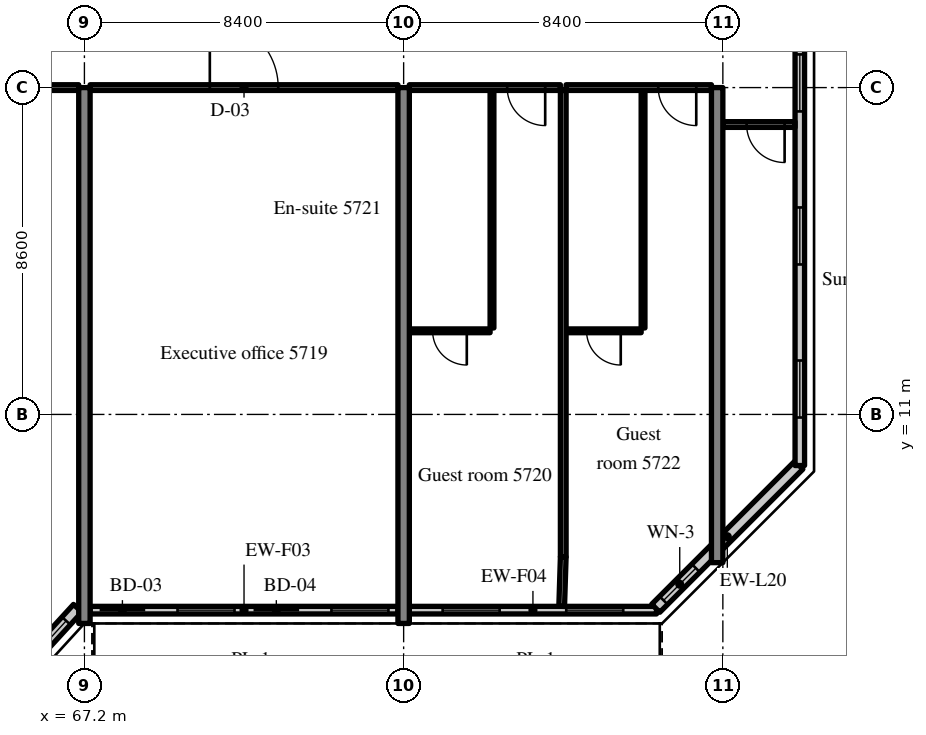
"""IFC4 building model, lengths in metres.
Left out: names, types, materials, properties, quantities, classifications, styles, units other than length and angle.
Written with IfcOpenShell. Run it as: python <this file> out.ifc"""

import sys

from ifc_helpers import new_model, si_unit, direction, frame, frame_2d, origin, place, context, subcontext, project, spatial, rectangle, extrude, source, transform, mapped, element, fill, save


model = new_model("IFC4")
c1 = context("Model", 3, precision=1e-05, world=origin(), true_north=direction((0.0, 1.0)))
c2 = subcontext(c1, "Body", "Model", "MODEL_VIEW")
j1 = project(units=[si_unit("LENGTHUNIT", "METRE"), si_unit("PLANEANGLEUNIT", "RADIAN")], contexts=[c1])
p1 = place(None, origin())
s1 = spatial("IfcSite", under=j1, at=p1, CompositionType="ELEMENT")
p2 = place(p1, origin())
s2 = spatial("IfcBuilding", under=s1, at=p2, CompositionType="ELEMENT")
p3 = place(p2, frame((0.0, 0.0, 237.4)))
s3 = spatial("IfcBuildingStorey", under=s2, at=p3, CompositionType="ELEMENT", Elevation=237.4)
m1 = source(origin(), c2, "Body", "SweptSolid", [
    extrude(rectangle(XDim=14.1, YDim=0.3, at=frame_2d((7.05, 0.0))), origin(), (0.0, 0.0, 1.0), 3.62),
])
for number, where, z_axis, x_axis in (
    (1, (67.2, 5.5, 0.0), (0.0, 0.0, 1.0), (0.0, 1.0, 0.0)),
    (2, (75.6, 5.5, 0.0), (0.0, 0.0, 1.0), (0.0, 1.0, 0.0)),
):
    element("IfcWall", number, at=place(p3, frame(where, z_axis=z_axis, x_axis=x_axis)), inside=s3, PredefinedType="SHEAR", context=c2, shape_type="MappedRepresentation", body=[
        mapped(m1, transform((0.0, 0.0, 0.0), scale=1.0)),
    ])
m2 = source(origin(), c2, "Body", "SweptSolid", [
    extrude(rectangle(XDim=12.5, YDim=0.3, at=frame_2d((6.25, 0.0))), origin(), (0.0, 0.0, 1.0), 3.62),
])
p4 = place(p3, frame((83.85, 7.1, 0.0), z_axis=(0.0, 0.0, 1.0), x_axis=(0.0, 1.0, 0.0)))
e3 = element("IfcWall", 3, at=p4, inside=s3, PredefinedType="SHEAR", context=c2, shape_type="MappedRepresentation", body=[
    mapped(m2, transform((0.0, 0.0, 0.0), scale=1.0)),
])
m3 = source(origin(), c2, "Body", "SweptSolid", [
    extrude(rectangle(XDim=2.398, YDim=0.3, at=frame_2d((1.199, 0.0))), origin(), (0.0, 0.0, 1.0), 3.62),
])
p5 = place(p3, frame((65.404, 4.131, 0.0), z_axis=(0.0, 0.0, 1.0), x_axis=(0.675374189419, 0.737475222815, 0.0)))
e4 = element("IfcWall", 4, at=p5, inside=s3, PredefinedType="SOLIDWALL", context=c2, shape_type="MappedRepresentation", body=[
    mapped(m3, transform((0.0, 0.0, 0.0), scale=1.0)),
])
m4 = source(origin(), c2, "Body", "SweptSolid", [
    extrude(rectangle(XDim=1.5, YDim=2.0, at=frame_2d((0.75, 1.0))), frame((0.0, 0.16, 0.0), z_axis=(0.0, -1.0, 0.0), x_axis=(1.0, 0.0, 0.0)), (0.0, 0.0, 1.0), 0.32),
])
p6 = place(p5, frame((0.449, 0.0, 0.9)))
e5 = element("IfcOpeningElement", 5, at=p6, cuts=e4, PredefinedType="OPENING", context=c2, shape_type="MappedRepresentation", body=[
    mapped(m4, transform((0.0, 0.0, 0.0), scale=1.0)),
])
m5 = source(origin(), c2, "Body", "SweptSolid", [
    extrude(rectangle(XDim=8.1, YDim=0.2, at=frame_2d((4.05, 0.0))), origin(), (0.0, 0.0, 1.0), 3.02),
])
p7 = place(p3, frame((67.35, 5.85, 0.0), z_axis=(0.0, 0.0, 1.0), x_axis=(1.0, 0.0, 0.0)))
e6 = element("IfcWall", 6, at=p7, inside=s3, PredefinedType="SOLIDWALL", context=c2, shape_type="MappedRepresentation", body=[
    mapped(m5, transform((0.0, 0.0, 0.0), scale=1.0)),
])
m6 = source(origin(), c2, "Body", "SweptSolid", [
    extrude(rectangle(XDim=1.2, YDim=2.4, at=frame_2d((0.6, 1.2))), frame((0.0, 0.11, 0.0), z_axis=(0.0, -1.0, 0.0), x_axis=(1.0, 0.0, 0.0)), (0.0, 0.0, 1.0), 0.22),
])
p8 = place(p7, frame((0.25, 0.0, 0.0)))
e7 = element("IfcOpeningElement", 7, at=p8, cuts=e6, PredefinedType="OPENING", context=c2, shape_type="MappedRepresentation", body=[
    mapped(m6, transform((0.0, 0.0, 0.0), scale=1.0)),
])
m7 = source(origin(), c2, "Body", "SweptSolid", [
    extrude(rectangle(XDim=1.5, YDim=1.5, at=frame_2d((0.75, 0.75))), frame((0.0, 0.11, 0.0), z_axis=(0.0, -1.0, 0.0), x_axis=(1.0, 0.0, 0.0)), (0.0, 0.0, 1.0), 0.22),
])
p9 = place(p7, frame((2.3, 0.0, 0.9)))
e8 = element("IfcOpeningElement", 8, at=p9, cuts=e6, PredefinedType="OPENING", context=c2, shape_type="MappedRepresentation", body=[
    mapped(m7, transform((0.0, 0.0, 0.0), scale=1.0)),
])
p10 = place(p7, frame((4.3, 0.0, 0.0)))
e9 = element("IfcOpeningElement", 9, at=p10, cuts=e6, PredefinedType="OPENING", context=c2, shape_type="MappedRepresentation", body=[
    mapped(m6, transform((0.0, 0.0, 0.0), scale=1.0)),
])
p11 = place(p7, frame((6.35, 0.0, 0.9)))
e10 = element("IfcOpeningElement", 10, at=p11, cuts=e6, PredefinedType="OPENING", context=c2, shape_type="MappedRepresentation", body=[
    mapped(m7, transform((0.0, 0.0, 0.0), scale=1.0)),
])
m8 = source(origin(), c2, "Body", "SweptSolid", [
    extrude(rectangle(XDim=6.505, YDim=0.2, at=frame_2d((3.252, 0.0))), origin(), (0.0, 0.0, 1.0), 3.02),
])
p12 = place(p3, frame((75.75, 5.85, 0.0), z_axis=(0.0, 0.0, 1.0), x_axis=(1.0, 0.0, 0.0)))
e11 = element("IfcWall", 11, at=p12, inside=s3, PredefinedType="SOLIDWALL", context=c2, shape_type="MappedRepresentation", body=[
    mapped(m8, transform((0.0, 0.0, 0.0), scale=1.0)),
])
p13 = place(p12, frame((0.876, 0.0, 0.9)))
e12 = element("IfcOpeningElement", 12, at=p13, cuts=e11, PredefinedType="OPENING", context=c2, shape_type="MappedRepresentation", body=[
    mapped(m7, transform((0.0, 0.0, 0.0), scale=1.0)),
])
p14 = place(p12, frame((4.129, 0.0, 0.9)))
e13 = element("IfcOpeningElement", 13, at=p14, cuts=e11, PredefinedType="OPENING", context=c2, shape_type="MappedRepresentation", body=[
    mapped(m7, transform((0.0, 0.0, 0.0), scale=1.0)),
])
m9 = source(origin(), c2, "Body", "SweptSolid", [
    extrude(rectangle(XDim=5.326, YDim=0.3, at=frame_2d((2.663, 0.0))), origin(), (0.0, 0.0, 1.0), 3.62),
])
p15 = place(p3, frame((82.234, 5.9, 0.0), z_axis=(0.0, 0.0, 1.0), x_axis=(0.707083859269, 0.707129702361, 0.0)))
e14 = element("IfcWall", 14, at=p15, inside=s3, PredefinedType="SOLIDWALL", context=c2, shape_type="MappedRepresentation", body=[
    mapped(m9, transform((0.0, 0.0, 0.0), scale=1.0)),
])
m10 = source(origin(), c2, "Body", "SweptSolid", [
    extrude(rectangle(XDim=1.2, YDim=1.5, at=frame_2d((0.6, 0.75))), frame((0.0, 0.16, 0.0), z_axis=(0.0, -1.0, 0.0), x_axis=(1.0, 0.0, 0.0)), (0.0, 0.0, 1.0), 0.32),
])
p16 = place(p15, frame((0.292, 0.0, 0.9)))
e15 = element("IfcOpeningElement", 15, at=p16, cuts=e14, PredefinedType="OPENING", context=c2, shape_type="MappedRepresentation", body=[
    mapped(m10, transform((0.0, 0.0, 0.0), scale=1.0)),
])
m11 = source(origin(), c2, "Body", "SweptSolid", [
    extrude(rectangle(XDim=28.189, YDim=0.25, at=frame_2d((14.095, 0.0))), origin(), (0.0, 0.0, 1.0), 3.62),
])
p17 = place(p3, frame((86.025, 9.655, 0.0), z_axis=(0.0, 0.0, 1.0), x_axis=(0.0, 1.0, 0.0)))
e16 = element("IfcWall", 16, at=p17, inside=s3, PredefinedType="SOLIDWALL", context=c2, shape_type="MappedRepresentation", body=[
    mapped(m11, transform((0.0, 0.0, 0.0), scale=1.0)),
])
m12 = source(origin(), c2, "Body", "SweptSolid", [
    extrude(rectangle(XDim=1.5, YDim=1.5, at=frame_2d((0.75, 0.75))), frame((0.0, 0.135, 0.0), z_axis=(0.0, -1.0, 0.0), x_axis=(1.0, 0.0, 0.0)), (0.0, 0.0, 1.0), 0.27),
])
p18 = place(p17, frame((1.263, 0.0, 0.9)))
e17 = element("IfcOpeningElement", 17, at=p18, cuts=e16, PredefinedType="OPENING", context=c2, shape_type="MappedRepresentation", body=[
    mapped(m12, transform((0.0, 0.0, 0.0), scale=1.0)),
])
p19 = place(p17, frame((5.291, 0.0, 0.9)))
e18 = element("IfcOpeningElement", 18, at=p19, cuts=e16, PredefinedType="OPENING", context=c2, shape_type="MappedRepresentation", body=[
    mapped(m12, transform((0.0, 0.0, 0.0), scale=1.0)),
])
p20 = place(p17, frame((9.318, 0.0, 0.9)))
e19 = element("IfcOpeningElement", 19, at=p20, cuts=e16, PredefinedType="OPENING", context=c2, shape_type="MappedRepresentation", body=[
    mapped(m12, transform((0.0, 0.0, 0.0), scale=1.0)),
])
p21 = place(p17, frame((13.345, 0.0, 0.9)))
e20 = element("IfcOpeningElement", 20, at=p21, cuts=e16, PredefinedType="OPENING", context=c2, shape_type="MappedRepresentation", body=[
    mapped(m12, transform((0.0, 0.0, 0.0), scale=1.0)),
])
p22 = place(p17, frame((17.372, 0.0, 0.9)))
e21 = element("IfcOpeningElement", 21, at=p22, cuts=e16, PredefinedType="OPENING", context=c2, shape_type="MappedRepresentation", body=[
    mapped(m12, transform((0.0, 0.0, 0.0), scale=1.0)),
])
p23 = place(p17, frame((21.399, 0.0, 0.9)))
e22 = element("IfcOpeningElement", 22, at=p23, cuts=e16, PredefinedType="OPENING", context=c2, shape_type="MappedRepresentation", body=[
    mapped(m12, transform((0.0, 0.0, 0.0), scale=1.0)),
])
p24 = place(p17, frame((25.426, 0.0, 0.9)))
e23 = element("IfcOpeningElement", 23, at=p24, cuts=e16, PredefinedType="OPENING", context=c2, shape_type="MappedRepresentation", body=[
    mapped(m12, transform((0.0, 0.0, 0.0), scale=1.0)),
])
m13 = source(origin(), c2, "Body", "SweptSolid", [
    extrude(rectangle(XDim=3.975, YDim=0.15, at=frame_2d((1.988, 0.0))), origin(), (0.0, 0.0, 1.0), 2.92),
])
p25 = place(p3, frame((63.075, 19.6, 0.0), z_axis=(0.0, 0.0, 1.0), x_axis=(1.0, 0.0, 0.0)))
e24 = element("IfcWall", 24, at=p25, inside=s3, PredefinedType="PARTITIONING", context=c2, shape_type="MappedRepresentation", body=[
    mapped(m13, transform((0.0, 0.0, 0.0), scale=1.0)),
])
m14 = source(origin(), c2, "Body", "SweptSolid", [
    extrude(rectangle(XDim=1.0, YDim=2.1, at=frame_2d((0.5, 1.05))), frame((0.0, 0.085, 0.0), z_axis=(0.0, -1.0, 0.0), x_axis=(1.0, 0.0, 0.0)), (0.0, 0.0, 1.0), 0.17),
])
p26 = place(p25, frame((1.487, 0.0, 0.0)))
e25 = element("IfcOpeningElement", 25, at=p26, cuts=e24, PredefinedType="OPENING", context=c2, shape_type="MappedRepresentation", body=[
    mapped(m14, transform((0.0, 0.0, 0.0), scale=1.0)),
])
m15 = source(origin(), c2, "Body", "SweptSolid", [
    extrude(rectangle(XDim=8.1, YDim=0.15, at=frame_2d((4.05, 0.0))), origin(), (0.0, 0.0, 1.0), 2.92),
])
p27 = place(p3, frame((67.35, 19.6, 0.0), z_axis=(0.0, 0.0, 1.0), x_axis=(1.0, 0.0, 0.0)))
e26 = element("IfcWall", 26, at=p27, inside=s3, PredefinedType="PARTITIONING", context=c2, shape_type="MappedRepresentation", body=[
    mapped(m15, transform((0.0, 0.0, 0.0), scale=1.0)),
])
m16 = source(origin(), c2, "Body", "SweptSolid", [
    extrude(rectangle(XDim=1.8, YDim=2.1, at=frame_2d((0.9, 1.05))), frame((0.0, 0.085, 0.0), z_axis=(0.0, -1.0, 0.0), x_axis=(1.0, 0.0, 0.0)), (0.0, 0.0, 1.0), 0.17),
])
p28 = place(p27, frame((3.15, 0.0, 0.0)))
e27 = element("IfcOpeningElement", 27, at=p28, cuts=e26, PredefinedType="OPENING", context=c2, shape_type="MappedRepresentation", body=[
    mapped(m16, transform((0.0, 0.0, 0.0), scale=1.0)),
])
m17 = source(origin(), c2, "Body", "SweptSolid", [
    extrude(rectangle(XDim=6.25, YDim=0.1, at=frame_2d((3.125, 0.0))), origin(), (0.0, 0.0, 1.0), 3.62),
])
p29 = place(p3, frame((77.925, 13.275, 0.0), z_axis=(0.0, 0.0, 1.0), x_axis=(0.0, 1.0, 0.0)))
e28 = element("IfcWall", 28, at=p29, inside=s3, PredefinedType="PARTITIONING", context=c2, shape_type="MappedRepresentation", body=[
    mapped(m17, transform((0.0, 0.0, 0.0), scale=1.0)),
])
m18 = source(origin(), c2, "Body", "SweptSolid", [
    extrude(rectangle(XDim=2.125, YDim=0.1, at=frame_2d((1.062, 0.0))), origin(), (0.0, 0.0, 1.0), 3.62),
])
p30 = place(p3, frame((75.75, 13.2, 0.0), z_axis=(0.0, 0.0, 1.0), x_axis=(1.0, 0.0, 0.0)))
e29 = element("IfcWall", 29, at=p30, inside=s3, PredefinedType="PARTITIONING", context=c2, shape_type="MappedRepresentation", body=[
    mapped(m18, transform((0.0, 0.0, 0.0), scale=1.0)),
])
m19 = source(origin(), c2, "Body", "SweptSolid", [
    extrude(rectangle(XDim=0.9, YDim=2.1, at=frame_2d((0.45, 1.05))), frame((0.0, 0.06, 0.0), z_axis=(0.0, -1.0, 0.0), x_axis=(1.0, 0.0, 0.0)), (0.0, 0.0, 1.0), 0.12),
])
p31 = place(p30, frame((0.612, 0.0, 0.0)))
e30 = element("IfcOpeningElement", 30, at=p31, cuts=e29, PredefinedType="OPENING", context=c2, shape_type="MappedRepresentation", body=[
    mapped(m19, transform((0.0, 0.0, 0.0), scale=1.0)),
])
p32 = place(p3, frame((75.75, 19.6, 0.0), z_axis=(0.0, 0.0, 1.0), x_axis=(1.0, 0.0, 0.0)))
e31 = element("IfcWall", 31, at=p32, inside=s3, PredefinedType="PARTITIONING", context=c2, shape_type="MappedRepresentation", body=[
    mapped(m13, transform((0.0, 0.0, 0.0), scale=1.0)),
])
p33 = place(p32, frame((2.575, 0.0, 0.0)))
e32 = element("IfcOpeningElement", 32, at=p33, cuts=e31, PredefinedType="OPENING", context=c2, shape_type="MappedRepresentation", body=[
    mapped(m14, transform((0.0, 0.0, 0.0), scale=1.0)),
])
p34 = place(p3, frame((81.9, 13.275, 0.0), z_axis=(0.0, 0.0, 1.0), x_axis=(0.0, 1.0, 0.0)))
e33 = element("IfcWall", 33, at=p34, inside=s3, PredefinedType="PARTITIONING", context=c2, shape_type="MappedRepresentation", body=[
    mapped(m17, transform((0.0, 0.0, 0.0), scale=1.0)),
])
m20 = source(origin(), c2, "Body", "SweptSolid", [
    extrude(rectangle(XDim=1.975, YDim=0.1, at=frame_2d((0.988, 0.0))), origin(), (0.0, 0.0, 1.0), 3.62),
])
p35 = place(p3, frame((79.875, 13.2, 0.0), z_axis=(0.0, 0.0, 1.0), x_axis=(1.0, 0.0, 0.0)))
e34 = element("IfcWall", 34, at=p35, inside=s3, PredefinedType="PARTITIONING", context=c2, shape_type="MappedRepresentation", body=[
    mapped(m20, transform((0.0, 0.0, 0.0), scale=1.0)),
])
p36 = place(p35, frame((0.538, 0.0, 0.0)))
e35 = element("IfcOpeningElement", 35, at=p36, cuts=e34, PredefinedType="OPENING", context=c2, shape_type="MappedRepresentation", body=[
    mapped(m19, transform((0.0, 0.0, 0.0), scale=1.0)),
])
m21 = source(origin(), c2, "Body", "SweptSolid", [
    extrude(rectangle(XDim=3.825, YDim=0.15, at=frame_2d((1.913, 0.0))), origin(), (0.0, 0.0, 1.0), 2.92),
])
p37 = place(p3, frame((79.875, 19.6, 0.0), z_axis=(0.0, 0.0, 1.0), x_axis=(1.0, 0.0, 0.0)))
e36 = element("IfcWall", 36, at=p37, inside=s3, PredefinedType="PARTITIONING", context=c2, shape_type="MappedRepresentation", body=[
    mapped(m21, transform((0.0, 0.0, 0.0), scale=1.0)),
])
p38 = place(p37, frame((2.425, 0.0, 0.0)))
e37 = element("IfcOpeningElement", 37, at=p38, cuts=e36, PredefinedType="OPENING", context=c2, shape_type="MappedRepresentation", body=[
    mapped(m14, transform((0.0, 0.0, 0.0), scale=1.0)),
])
m22 = source(origin(), c2, "Body", "SweptSolid", [
    extrude(rectangle(XDim=12.275, YDim=0.15, at=frame_2d((6.137, 0.0))), origin(), (0.0, 0.0, 1.0), 3.62),
])
p39 = place(p3, frame((79.8, 7.25, 0.0), z_axis=(0.0, 0.0, 1.0), x_axis=(0.0, 1.0, 0.0)))
e38 = element("IfcWall", 38, at=p39, inside=s3, PredefinedType="PARTITIONING", context=c2, shape_type="MappedRepresentation", body=[
    mapped(m22, transform((0.0, 0.0, 0.0), scale=1.0)),
])
m23 = source(origin(), c2, "Body", "SweptSolid", [
    extrude(rectangle(XDim=1.9, YDim=0.15, at=frame_2d((0.95, 0.0))), origin(), (0.0, 0.0, 1.0), 2.92),
])
p40 = place(p3, frame((84.0, 18.628, 0.0), z_axis=(0.0, 0.0, 1.0), x_axis=(1.0, 0.0, 0.0)))
e39 = element("IfcWall", 39, at=p40, inside=s3, PredefinedType="PARTITIONING", context=c2, shape_type="MappedRepresentation", body=[
    mapped(m23, transform((0.0, 0.0, 0.0), scale=1.0)),
])
p41 = place(p40, frame((0.625, 0.0, 0.0)))
e40 = element("IfcOpeningElement", 40, at=p41, cuts=e39, PredefinedType="OPENING", context=c2, shape_type="MappedRepresentation", body=[
    mapped(m14, transform((0.0, 0.0, 0.0), scale=1.0)),
])
m24 = source(origin(), c2, "Body", "SweptSolid", [
    extrude(rectangle(XDim=1.301, YDim=0.15, at=frame_2d((0.65, 0.0))), origin(), (0.0, 0.0, 1.0), 3.62),
])
p42 = place(p3, frame((79.759, 5.95, 0.0), z_axis=(0.0, 0.0, 1.0), x_axis=(0.031533606063, 0.999502692187, 0.0)))
e41 = element("IfcWall", 41, at=p42, inside=s3, PredefinedType="PARTITIONING", context=c2, shape_type="MappedRepresentation", body=[
    mapped(m24, transform((0.0, 0.0, 0.0), scale=1.0)),
])
m25 = source(origin(), c2, "Body", "SweptSolid", [
    extrude(rectangle(XDim=1.5, YDim=2.0, at=frame_2d((0.75, 1.0))), frame((0.0, 0.03, 0.0), z_axis=(0.0, -1.0, 0.0), x_axis=(1.0, 0.0, 0.0)), (0.0, 0.0, 1.0), 0.06),
])
p43 = place(p6, origin())
e42 = element("IfcWindow", 42, at=p43, inside=s3, PartitioningType="SINGLE_PANEL", PredefinedType="WINDOW", context=c2, shape_type="MappedRepresentation", body=[
    mapped(m25, transform((0.0, 0.0, 0.0), scale=1.0)),
])
fill(e5, e42)
m26 = source(origin(), c2, "Body", "SweptSolid", [
    extrude(rectangle(XDim=1.2, YDim=2.4, at=frame_2d((0.6, 1.2))), frame((0.0, 0.025, 0.0), z_axis=(0.0, -1.0, 0.0), x_axis=(1.0, 0.0, 0.0)), (0.0, 0.0, 1.0), 0.05),
])
p44 = place(p8, origin())
e43 = element("IfcDoor", 43, at=p44, inside=s3, OperationType="SLIDING_TO_LEFT", PredefinedType="DOOR", context=c2, shape_type="MappedRepresentation", body=[
    mapped(m26, transform((0.0, 0.0, 0.0), scale=1.0)),
])
fill(e7, e43)
m27 = source(origin(), c2, "Body", "SweptSolid", [
    extrude(rectangle(XDim=1.5, YDim=1.5, at=frame_2d((0.75, 0.75))), frame((0.0, 0.03, 0.0), z_axis=(0.0, -1.0, 0.0), x_axis=(1.0, 0.0, 0.0)), (0.0, 0.0, 1.0), 0.06),
])
p45 = place(p9, origin())
e44 = element("IfcWindow", 44, at=p45, inside=s3, PartitioningType="SINGLE_PANEL", PredefinedType="WINDOW", context=c2, shape_type="MappedRepresentation", body=[
    mapped(m27, transform((0.0, 0.0, 0.0), scale=1.0)),
])
fill(e8, e44)
p46 = place(p10, origin())
e45 = element("IfcDoor", 45, at=p46, inside=s3, OperationType="SLIDING_TO_RIGHT", PredefinedType="DOOR", context=c2, shape_type="MappedRepresentation", body=[
    mapped(m26, transform((0.0, 0.0, 0.0), scale=1.0)),
])
fill(e9, e45)
p47 = place(p11, origin())
e46 = element("IfcWindow", 46, at=p47, inside=s3, PartitioningType="SINGLE_PANEL", PredefinedType="WINDOW", context=c2, shape_type="MappedRepresentation", body=[
    mapped(m27, transform((0.0, 0.0, 0.0), scale=1.0)),
])
fill(e10, e46)
p48 = place(p13, origin())
e47 = element("IfcWindow", 47, at=p48, inside=s3, PartitioningType="SINGLE_PANEL", PredefinedType="WINDOW", context=c2, shape_type="MappedRepresentation", body=[
    mapped(m27, transform((0.0, 0.0, 0.0), scale=1.0)),
])
fill(e12, e47)
p49 = place(p14, origin())
e48 = element("IfcWindow", 48, at=p49, inside=s3, PartitioningType="SINGLE_PANEL", PredefinedType="WINDOW", context=c2, shape_type="MappedRepresentation", body=[
    mapped(m27, transform((0.0, 0.0, 0.0), scale=1.0)),
])
fill(e13, e48)
m28 = source(origin(), c2, "Body", "SweptSolid", [
    extrude(rectangle(XDim=1.2, YDim=1.5, at=frame_2d((0.6, 0.75))), frame((0.0, 0.03, 0.0), z_axis=(0.0, -1.0, 0.0), x_axis=(1.0, 0.0, 0.0)), (0.0, 0.0, 1.0), 0.06),
])
p50 = place(p16, origin())
e49 = element("IfcWindow", 49, at=p50, inside=s3, PartitioningType="SINGLE_PANEL", PredefinedType="WINDOW", context=c2, shape_type="MappedRepresentation", body=[
    mapped(m28, transform((0.0, 0.0, 0.0), scale=1.0)),
])
fill(e15, e49)
p51 = place(p18, origin())
e50 = element("IfcWindow", 50, at=p51, inside=s3, PartitioningType="SINGLE_PANEL", PredefinedType="WINDOW", context=c2, shape_type="MappedRepresentation", body=[
    mapped(m27, transform((0.0, 0.0, 0.0), scale=1.0)),
])
fill(e17, e50)
p52 = place(p19, origin())
e51 = element("IfcWindow", 51, at=p52, inside=s3, PartitioningType="SINGLE_PANEL", PredefinedType="WINDOW", context=c2, shape_type="MappedRepresentation", body=[
    mapped(m27, transform((0.0, 0.0, 0.0), scale=1.0)),
])
fill(e18, e51)
p53 = place(p20, origin())
e52 = element("IfcWindow", 52, at=p53, inside=s3, PartitioningType="SINGLE_PANEL", PredefinedType="WINDOW", context=c2, shape_type="MappedRepresentation", body=[
    mapped(m27, transform((0.0, 0.0, 0.0), scale=1.0)),
])
fill(e19, e52)
m29 = source(origin(), c2, "Body", "SweptSolid", [
    extrude(rectangle(XDim=1.8, YDim=2.1, at=frame_2d((0.9, 1.05))), frame((0.0, 0.025, 0.0), z_axis=(0.0, -1.0, 0.0), x_axis=(1.0, 0.0, 0.0)), (0.0, 0.0, 1.0), 0.05),
])
p54 = place(p28, origin())
e53 = element("IfcDoor", 53, at=p54, inside=s3, OperationType="DOUBLE_DOOR_SINGLE_SWING", PredefinedType="DOOR", context=c2, shape_type="MappedRepresentation", body=[
    mapped(m29, transform((0.0, 0.0, 0.0), scale=1.0)),
])
fill(e27, e53)
m30 = source(origin(), c2, "Body", "SweptSolid", [
    extrude(rectangle(XDim=0.9, YDim=2.1, at=frame_2d((0.45, 1.05))), frame((0.0, 0.025, 0.0), z_axis=(0.0, -1.0, 0.0), x_axis=(1.0, 0.0, 0.0)), (0.0, 0.0, 1.0), 0.05),
])
p55 = place(p31, origin())
e54 = element("IfcDoor", 54, at=p55, inside=s3, OperationType="SINGLE_SWING_RIGHT", PredefinedType="DOOR", context=c2, shape_type="MappedRepresentation", body=[
    mapped(m30, transform((0.0, 0.0, 0.0), scale=1.0)),
])
fill(e30, e54)
m31 = source(origin(), c2, "Body", "SweptSolid", [
    extrude(rectangle(XDim=1.0, YDim=2.1, at=frame_2d((0.5, 1.05))), frame((0.0, 0.025, 0.0), z_axis=(0.0, -1.0, 0.0), x_axis=(1.0, 0.0, 0.0)), (0.0, 0.0, 1.0), 0.05),
])
p56 = place(p33, origin())
e55 = element("IfcDoor", 55, at=p56, inside=s3, OperationType="SINGLE_SWING_RIGHT", PredefinedType="DOOR", context=c2, shape_type="MappedRepresentation", body=[
    mapped(m31, transform((0.0, 0.0, 0.0), scale=1.0)),
])
fill(e32, e55)
p57 = place(p36, origin())
e56 = element("IfcDoor", 56, at=p57, inside=s3, OperationType="SINGLE_SWING_RIGHT", PredefinedType="DOOR", context=c2, shape_type="MappedRepresentation", body=[
    mapped(m30, transform((0.0, 0.0, 0.0), scale=1.0)),
])
fill(e35, e56)
p58 = place(p38, origin())
e57 = element("IfcDoor", 57, at=p58, inside=s3, OperationType="SINGLE_SWING_RIGHT", PredefinedType="DOOR", context=c2, shape_type="MappedRepresentation", body=[
    mapped(m31, transform((0.0, 0.0, 0.0), scale=1.0)),
])
fill(e37, e57)
p59 = place(p41, origin())
e58 = element("IfcDoor", 58, at=p59, inside=s3, OperationType="SINGLE_SWING_RIGHT", PredefinedType="DOOR", context=c2, shape_type="MappedRepresentation", body=[
    mapped(m31, transform((0.0, 0.0, 0.0), scale=1.0)),
])
fill(e40, e58)
save(model, sys.argv[1])
